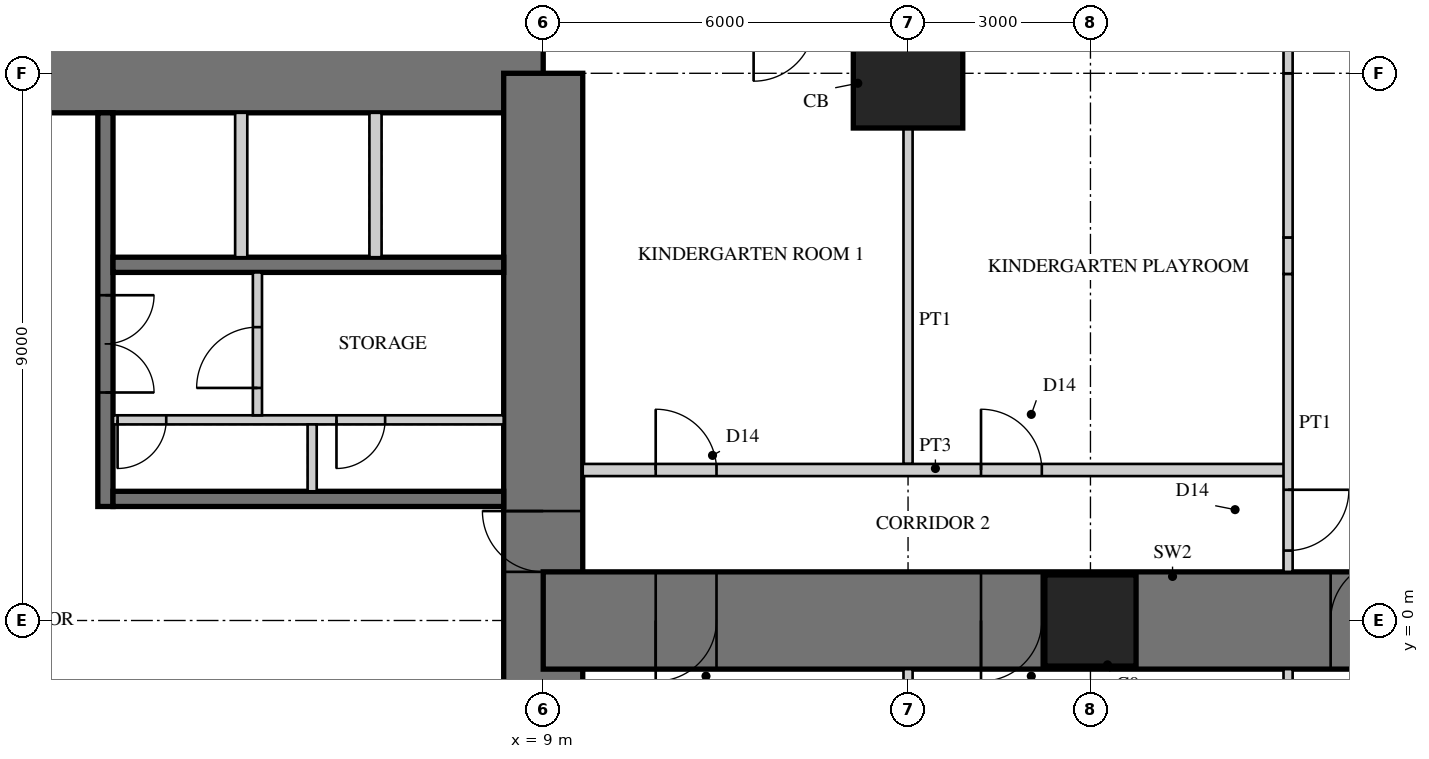
"""IFC4 building model, lengths in metres.
Left out: names, types, materials, properties, quantities, classifications, styles, units other than length and angle.
Written with IfcOpenShell. Run it as: python <this file> out.ifc"""

import sys

from ifc_helpers import new_model, si_unit, direction, frame, frame_2d, origin, origin_2d, place, context, subcontext, project, spatial, rectangle, extrude, element, fill, save


model = new_model("IFC4")
c1 = context("Model", 3, precision=1e-05, world=origin(), true_north=direction((0.0, 1.0)))
c2 = subcontext(c1, "Body", "Model", "MODEL_VIEW")
j1 = project(units=[si_unit("LENGTHUNIT", "METRE"), si_unit("PLANEANGLEUNIT", "RADIAN")], contexts=[c1])
p1 = place(None, origin())
s1 = spatial("IfcSite", under=j1, at=p1, CompositionType="ELEMENT")
p2 = place(p1, origin())
s2 = spatial("IfcBuilding", under=s1, at=p2, CompositionType="ELEMENT")
p3 = place(p2, frame((0.0, 0.0, 5.0)))
s3 = spatial("IfcBuildingStorey", under=s2, at=p3, CompositionType="ELEMENT", Elevation=5.0)
p4 = place(p3, frame((9.0, 9.0, 0.0), z_axis=(0.0, 0.0, 1.0), x_axis=(-1.0, 0.0, 0.0)))
e1 = element("IfcWall", 1, at=p4, inside=s3, PredefinedType="SHEAR", context=c2, shape_type="SweptSolid", body=[
    extrude(rectangle(XDim=18.0, YDim=1.3, at=frame_2d((9.0, 0.0))), origin(), (0.0, 0.0, 1.0), 4.5),
])
p5 = place(p4, frame((9.8, 0.0, 0.0)))
e2 = element("IfcOpeningElement", 2, at=p5, cuts=e1, PredefinedType="OPENING", context=c2, shape_type="SweptSolid", body=[
    extrude(rectangle(XDim=1.0, YDim=2.4, at=frame_2d((0.5, 1.2))), frame((0.0, 0.66, 0.0), z_axis=(0.0, -1.0, 0.0), x_axis=(1.0, 0.0, 0.0)), (0.0, 0.0, 1.0), 1.32),
])
p6 = place(p3, frame((9.0, -9.0, 0.0), z_axis=(0.0, 0.0, 1.0), x_axis=(0.0, 1.0, 0.0)))
e3 = element("IfcWall", 3, at=p6, inside=s3, PredefinedType="SHEAR", context=c2, shape_type="SweptSolid", body=[
    extrude(rectangle(XDim=18.0, YDim=1.3, at=frame_2d((9.0, 0.0))), origin(), (0.0, 0.0, 1.0), 4.5),
])
p7 = place(p6, frame((9.8, 0.0, 0.0)))
e4 = element("IfcOpeningElement", 4, at=p7, cuts=e3, PredefinedType="OPENING", context=c2, shape_type="SweptSolid", body=[
    extrude(rectangle(XDim=1.0, YDim=2.4, at=frame_2d((0.5, 1.2))), frame((0.0, 0.66, 0.0), z_axis=(0.0, -1.0, 0.0), x_axis=(1.0, 0.0, 0.0)), (0.0, 0.0, 1.0), 1.32),
])
p8 = place(p3, frame((1.8, 1.875, 0.0), z_axis=(0.0, 0.0, 1.0), x_axis=(0.0, 1.0, 0.0)))
e5 = element("IfcWall", 5, at=p8, inside=s3, PredefinedType="SHEAR", context=c2, shape_type="SweptSolid", body=[
    extrude(rectangle(XDim=6.475, YDim=0.25, at=frame_2d((3.238, 0.0))), origin(), (0.0, 0.0, 1.0), 4.5),
])
p9 = place(p8, frame((1.875, 0.0, 0.0)))
e6 = element("IfcOpeningElement", 6, at=p9, cuts=e5, PredefinedType="OPENING", context=c2, shape_type="SweptSolid", body=[
    extrude(rectangle(XDim=1.6, YDim=2.4, at=frame_2d((0.8, 1.2))), frame((0.0, 0.135, 0.0), z_axis=(0.0, -1.0, 0.0), x_axis=(1.0, 0.0, 0.0)), (0.0, 0.0, 1.0), 0.27),
])
for number, where, z_axis, x_axis in (
    (7, (1.925, 2.0, 0.0), (0.0, 0.0, 1.0), (1.0, 0.0, 0.0)),
    (8, (1.925, 5.85, 0.0), (0.0, 0.0, 1.0), (1.0, 0.0, 0.0)),
):
    element("IfcWall", number, at=place(p3, frame(where, z_axis=z_axis, x_axis=x_axis)), inside=s3, PredefinedType="SHEAR", context=c2, shape_type="SweptSolid", body=[
        extrude(rectangle(XDim=6.425, YDim=0.25, at=frame_2d((3.212, 0.0))), origin(), (0.0, 0.0, 1.0), 4.5),
    ])
p10 = place(p3, frame((1.925, 3.3, 0.0), z_axis=(0.0, 0.0, 1.0), x_axis=(1.0, 0.0, 0.0)))
e9 = element("IfcWall", 9, at=p10, inside=s3, PredefinedType="PARTITIONING", context=c2, shape_type="SweptSolid", body=[
    extrude(rectangle(XDim=6.425, YDim=0.15, at=frame_2d((3.212, 0.0))), origin(), (0.0, 0.0, 1.0), 4.5),
])
p11 = place(p10, frame((0.075, 0.0, 0.0)))
e10 = element("IfcOpeningElement", 10, at=p11, cuts=e9, PredefinedType="OPENING", context=c2, shape_type="SweptSolid", body=[
    extrude(rectangle(XDim=0.8, YDim=2.1, at=frame_2d((0.4, 1.05))), frame((0.0, 0.085, 0.0), z_axis=(0.0, -1.0, 0.0), x_axis=(1.0, 0.0, 0.0)), (0.0, 0.0, 1.0), 0.17),
])
p12 = place(p10, frame((3.675, 0.0, 0.0)))
e11 = element("IfcOpeningElement", 11, at=p12, cuts=e9, PredefinedType="OPENING", context=c2, shape_type="SweptSolid", body=[
    extrude(rectangle(XDim=0.8, YDim=2.1, at=frame_2d((0.4, 1.05))), frame((0.0, 0.085, 0.0), z_axis=(0.0, -1.0, 0.0), x_axis=(1.0, 0.0, 0.0)), (0.0, 0.0, 1.0), 0.17),
])
p13 = place(p3, frame((5.2, 2.125, 0.0), z_axis=(0.0, 0.0, 1.0), x_axis=(0.0, 1.0, 0.0)))
e12 = element("IfcWall", 12, at=p13, inside=s3, PredefinedType="PARTITIONING", context=c2, shape_type="SweptSolid", body=[
    extrude(rectangle(XDim=1.1, YDim=0.15, at=frame_2d((0.55, 0.0))), origin(), (0.0, 0.0, 1.0), 4.5),
])
for number, where, z_axis, x_axis in (
    (13, (4.033, 5.975, 0.0), (0.0, 0.0, 1.0), (0.0, 1.0, 0.0)),
    (14, (6.242, 5.975, 0.0), (0.0, 0.0, 1.0), (0.0, 1.0, 0.0)),
):
    element("IfcWall", number, at=place(p3, frame(where, z_axis=z_axis, x_axis=x_axis)), inside=s3, PredefinedType="PARTITIONING", context=c2, shape_type="SweptSolid", body=[
        extrude(rectangle(XDim=2.375, YDim=0.2, at=frame_2d((1.188, 0.0))), origin(), (0.0, 0.0, 1.0), 4.5),
    ])
p14 = place(p3, frame((9.0, 0.0, 0.0), z_axis=(0.0, 0.0, 1.0), x_axis=(1.0, 0.0, 0.0)))
e15 = element("IfcWall", 15, at=p14, inside=s3, PredefinedType="SHEAR", context=c2, shape_type="SweptSolid", body=[
    extrude(rectangle(XDim=18.0, YDim=1.6, at=frame_2d((9.0, 0.0))), origin(), (0.0, 0.0, 1.0), 4.5),
])
p15 = place(p14, frame((1.85, 0.0, 0.0)))
e16 = element("IfcOpeningElement", 16, at=p15, cuts=e15, PredefinedType="OPENING", context=c2, shape_type="SweptSolid", body=[
    extrude(rectangle(XDim=1.0, YDim=2.2, at=frame_2d((0.5, 1.1))), frame((0.0, 0.81, 0.0), z_axis=(0.0, -1.0, 0.0), x_axis=(1.0, 0.0, 0.0)), (0.0, 0.0, 1.0), 1.62),
])
p16 = place(p14, frame((7.2, 0.0, 0.0)))
e17 = element("IfcOpeningElement", 17, at=p16, cuts=e15, PredefinedType="OPENING", context=c2, shape_type="SweptSolid", body=[
    extrude(rectangle(XDim=1.0, YDim=2.2, at=frame_2d((0.5, 1.1))), frame((0.0, 0.81, 0.0), z_axis=(0.0, -1.0, 0.0), x_axis=(1.0, 0.0, 0.0)), (0.0, 0.0, 1.0), 1.62),
])
p17 = place(p14, frame((12.95, 0.0, 0.0)))
e18 = element("IfcOpeningElement", 18, at=p17, cuts=e15, PredefinedType="OPENING", context=c2, shape_type="SweptSolid", body=[
    extrude(rectangle(XDim=1.0, YDim=2.2, at=frame_2d((0.5, 1.1))), frame((0.0, 0.81, 0.0), z_axis=(0.0, -1.0, 0.0), x_axis=(1.0, 0.0, 0.0)), (0.0, 0.0, 1.0), 1.62),
])
p18 = place(p3, frame((15.0, 9.0, 0.0), z_axis=(0.0, 0.0, 1.0), x_axis=(1.0, 0.0, 0.0)))
e19 = element("IfcColumn", 19, at=p18, inside=s3, PredefinedType="COLUMN", context=c2, shape_type="SweptSolid", body=[
    extrude(rectangle(XDim=1.8, YDim=1.8, at=origin_2d()), origin(), (0.0, 0.0, 1.0), 4.5),
])
p19 = place(p3, frame((18.0, 0.0, 0.0), z_axis=(0.0, 0.0, 1.0), x_axis=(1.0, 0.0, 0.0)))
e20 = element("IfcColumn", 20, at=p19, inside=s3, PredefinedType="COLUMN", context=c2, shape_type="SweptSolid", body=[
    extrude(rectangle(XDim=1.5, YDim=1.5, at=origin_2d()), origin(), (0.0, 0.0, 1.0), 4.5),
])
p20 = place(p3, frame((4.3, 3.375, 0.0), z_axis=(0.0, 0.0, 1.0), x_axis=(0.0, 1.0, 0.0)))
e21 = element("IfcWall", 21, at=p20, inside=s3, PredefinedType="PARTITIONING", context=c2, shape_type="SweptSolid", body=[
    extrude(rectangle(XDim=2.35, YDim=0.15, at=frame_2d((1.175, 0.0))), origin(), (0.0, 0.0, 1.0), 4.3),
])
p21 = place(p20, frame((0.45, 0.0, 0.0)))
e22 = element("IfcOpeningElement", 22, at=p21, cuts=e21, PredefinedType="OPENING", context=c2, shape_type="SweptSolid", body=[
    extrude(rectangle(XDim=1.0, YDim=2.1, at=frame_2d((0.5, 1.05))), frame((0.0, 0.085, 0.0), z_axis=(0.0, -1.0, 0.0), x_axis=(1.0, 0.0, 0.0)), (0.0, 0.0, 1.0), 0.17),
])
p22 = place(p3, frame((15.0, 2.575, 0.0), z_axis=(0.0, 0.0, 1.0), x_axis=(0.0, 1.0, 0.0)))
e23 = element("IfcWall", 23, at=p22, inside=s3, PredefinedType="PARTITIONING", context=c2, shape_type="SweptSolid", body=[
    extrude(rectangle(XDim=5.675, YDim=0.15, at=frame_2d((2.837, 0.0))), origin(), (0.0, 0.0, 1.0), 3.35),
])
p23 = place(p3, frame((15.0, -8.25, 0.0), z_axis=(0.0, 0.0, 1.0), x_axis=(0.0, 1.0, 0.0)))
e24 = element("IfcWall", 24, at=p23, inside=s3, PredefinedType="PARTITIONING", context=c2, shape_type="SweptSolid", body=[
    extrude(rectangle(XDim=7.45, YDim=0.15, at=frame_2d((3.725, 0.0))), origin(), (0.0, 0.0, 1.0), 3.35),
])
p24 = place(p3, frame((9.65, 2.475, 0.0), z_axis=(0.0, 0.0, 1.0), x_axis=(1.0, 0.0, 0.0)))
e25 = element("IfcWall", 25, at=p24, inside=s3, PredefinedType="SOLIDWALL", context=c2, shape_type="SweptSolid", body=[
    extrude(rectangle(XDim=11.6, YDim=0.2, at=frame_2d((5.8, 0.0))), origin(), (0.0, 0.0, 1.0), 4.3),
])
p25 = place(p24, frame((1.2, 0.0, 0.0)))
e26 = element("IfcOpeningElement", 26, at=p25, cuts=e25, PredefinedType="OPENING", context=c2, shape_type="SweptSolid", body=[
    extrude(rectangle(XDim=1.0, YDim=2.2, at=frame_2d((0.5, 1.1))), frame((0.0, 0.11, 0.0), z_axis=(0.0, -1.0, 0.0), x_axis=(1.0, 0.0, 0.0)), (0.0, 0.0, 1.0), 0.22),
])
p26 = place(p24, frame((6.55, 0.0, 0.0)))
e27 = element("IfcOpeningElement", 27, at=p26, cuts=e25, PredefinedType="OPENING", context=c2, shape_type="SweptSolid", body=[
    extrude(rectangle(XDim=1.0, YDim=2.2, at=frame_2d((0.5, 1.1))), frame((0.0, 0.11, 0.0), z_axis=(0.0, -1.0, 0.0), x_axis=(1.0, 0.0, 0.0)), (0.0, 0.0, 1.0), 0.22),
])
p27 = place(p3, frame((21.25, -5.7, 0.0), z_axis=(0.0, 0.0, 1.0), x_axis=(0.0, 1.0, 0.0)))
e28 = element("IfcWall", 28, at=p27, inside=s3, PredefinedType="PARTITIONING", context=c2, shape_type="SweptSolid", body=[
    extrude(rectangle(XDim=4.9, YDim=0.15, at=frame_2d((2.45, 0.0))), origin(), (0.0, 0.0, 1.0), 3.35),
])
p28 = place(p3, frame((21.25, 0.8, 0.0), z_axis=(0.0, 0.0, 1.0), x_axis=(0.0, 1.0, 0.0)))
e29 = element("IfcWall", 29, at=p28, inside=s3, PredefinedType="PARTITIONING", context=c2, shape_type="SweptSolid", body=[
    extrude(rectangle(XDim=4.9, YDim=0.15, at=frame_2d((2.45, 0.0))), origin(), (0.0, 0.0, 1.0), 3.35),
])
p29 = place(p28, frame((0.35, 0.0, 0.0)))
e30 = element("IfcOpeningElement", 30, at=p29, cuts=e29, PredefinedType="OPENING", context=c2, shape_type="SweptSolid", body=[
    extrude(rectangle(XDim=1.0, YDim=2.2, at=frame_2d((0.5, 1.1))), frame((0.0, 0.085, 0.0), z_axis=(0.0, -1.0, 0.0), x_axis=(1.0, 0.0, 0.0)), (0.0, 0.0, 1.0), 0.17),
])
p30 = place(p3, frame((21.25, 5.7, 0.0), z_axis=(0.0, 0.0, 1.0), x_axis=(0.0, 1.0, 0.0)))
e31 = element("IfcWall", 31, at=p30, inside=s3, PredefinedType="PARTITIONING", context=c2, shape_type="SweptSolid", body=[
    extrude(rectangle(XDim=0.6, YDim=0.15, at=frame_2d((0.3, 0.0))), origin(), (0.0, 0.0, 1.0), 4.3),
])
p31 = place(p3, frame((21.25, 6.3, 0.0), z_axis=(0.0, 0.0, 1.0), x_axis=(0.0, 1.0, 0.0)))
e32 = element("IfcWall", 32, at=p31, inside=s3, PredefinedType="PARTITIONING", context=c2, shape_type="SweptSolid", body=[
    extrude(rectangle(XDim=2.7, YDim=0.15, at=frame_2d((1.35, 0.0))), origin(), (0.0, 0.0, 1.0), 3.35),
])
p32 = place(p3, frame((21.25, 9.0, 0.0), z_axis=(0.0, 0.0, 1.0), x_axis=(0.0, 1.0, 0.0)))
e33 = element("IfcWall", 33, at=p32, inside=s3, PredefinedType="PARTITIONING", context=c2, shape_type="SweptSolid", body=[
    extrude(rectangle(XDim=0.72, YDim=0.15, at=frame_2d((0.36, 0.0))), origin(), (0.0, 0.0, 1.0), 4.3),
])
p33 = place(p21, origin())
e34 = element("IfcDoor", 34, at=p33, inside=s3, OperationType="SINGLE_SWING_LEFT", PredefinedType="DOOR", context=c2, shape_type="SweptSolid", body=[
    extrude(rectangle(XDim=1.0, YDim=2.1, at=frame_2d((0.5, 1.05))), frame((0.0, 0.025, 0.0), z_axis=(0.0, -1.0, 0.0), x_axis=(1.0, 0.0, 0.0)), (0.0, 0.0, 1.0), 0.05),
])
fill(e22, e34)
p34 = place(p25, origin())
e35 = element("IfcDoor", 35, at=p34, inside=s3, OperationType="SINGLE_SWING_LEFT", PredefinedType="DOOR", context=c2, shape_type="SweptSolid", body=[
    extrude(rectangle(XDim=1.0, YDim=2.2, at=frame_2d((0.5, 1.1))), frame((0.0, 0.025, 0.0), z_axis=(0.0, -1.0, 0.0), x_axis=(1.0, 0.0, 0.0)), (0.0, 0.0, 1.0), 0.05),
])
fill(e26, e35)
p35 = place(p26, origin())
e36 = element("IfcDoor", 36, at=p35, inside=s3, OperationType="SINGLE_SWING_LEFT", PredefinedType="DOOR", context=c2, shape_type="SweptSolid", body=[
    extrude(rectangle(XDim=1.0, YDim=2.2, at=frame_2d((0.5, 1.1))), frame((0.0, 0.025, 0.0), z_axis=(0.0, -1.0, 0.0), x_axis=(1.0, 0.0, 0.0)), (0.0, 0.0, 1.0), 0.05),
])
fill(e27, e36)
p36 = place(p29, frame((1.0, 0.0, 0.0), z_axis=(0.0, 0.0, 1.0), x_axis=(-1.0, 0.0, 0.0)))
e37 = element("IfcDoor", 37, at=p36, inside=s3, OperationType="SINGLE_SWING_LEFT", PredefinedType="DOOR", context=c2, shape_type="SweptSolid", body=[
    extrude(rectangle(XDim=1.0, YDim=2.2, at=frame_2d((0.5, 1.1))), frame((0.0, 0.025, 0.0), z_axis=(0.0, -1.0, 0.0), x_axis=(1.0, 0.0, 0.0)), (0.0, 0.0, 1.0), 0.05),
])
fill(e30, e37)
p37 = place(p15, frame((1.0, 0.0, 0.0), z_axis=(0.0, 0.0, 1.0), x_axis=(-1.0, 0.0, 0.0)))
e38 = element("IfcDoor", 38, at=p37, inside=s3, OperationType="SINGLE_SWING_RIGHT", PredefinedType="DOOR", context=c2, shape_type="SweptSolid", body=[
    extrude(rectangle(XDim=1.0, YDim=2.2, at=frame_2d((0.5, 1.1))), frame((0.0, 0.025, 0.0), z_axis=(0.0, -1.0, 0.0), x_axis=(1.0, 0.0, 0.0)), (0.0, 0.0, 1.0), 0.05),
])
fill(e16, e38)
p38 = place(p16, frame((1.0, 0.0, 0.0), z_axis=(0.0, 0.0, 1.0), x_axis=(-1.0, 0.0, 0.0)))
e39 = element("IfcDoor", 39, at=p38, inside=s3, OperationType="SINGLE_SWING_RIGHT", PredefinedType="DOOR", context=c2, shape_type="SweptSolid", body=[
    extrude(rectangle(XDim=1.0, YDim=2.2, at=frame_2d((0.5, 1.1))), frame((0.0, 0.025, 0.0), z_axis=(0.0, -1.0, 0.0), x_axis=(1.0, 0.0, 0.0)), (0.0, 0.0, 1.0), 0.05),
])
fill(e17, e39)
p39 = place(p17, origin())
e40 = element("IfcDoor", 40, at=p39, inside=s3, OperationType="SINGLE_SWING_RIGHT", PredefinedType="DOOR", context=c2, shape_type="SweptSolid", body=[
    extrude(rectangle(XDim=1.0, YDim=2.2, at=frame_2d((0.5, 1.1))), frame((0.0, 0.025, 0.0), z_axis=(0.0, -1.0, 0.0), x_axis=(1.0, 0.0, 0.0)), (0.0, 0.0, 1.0), 0.05),
])
fill(e18, e40)
p40 = place(p7, origin())
e41 = element("IfcDoor", 41, at=p40, inside=s3, OperationType="SINGLE_SWING_RIGHT", PredefinedType="DOOR", context=c2, shape_type="SweptSolid", body=[
    extrude(rectangle(XDim=1.0, YDim=2.4, at=frame_2d((0.5, 1.2))), frame((0.0, 0.055, 0.0), z_axis=(0.0, -1.0, 0.0), x_axis=(1.0, 0.0, 0.0)), (0.0, 0.0, 1.0), 0.05),
])
fill(e4, e41)
p41 = place(p9, frame((1.6, 0.0, 0.0), z_axis=(0.0, 0.0, 1.0), x_axis=(-1.0, 0.0, 0.0)))
e42 = element("IfcDoor", 42, at=p41, inside=s3, OperationType="DOUBLE_DOOR_SINGLE_SWING", PredefinedType="DOOR", context=c2, shape_type="SweptSolid", body=[
    extrude(rectangle(XDim=1.6, YDim=2.4, at=frame_2d((0.8, 1.2))), frame((0.0, 0.025, 0.0), z_axis=(0.0, -1.0, 0.0), x_axis=(1.0, 0.0, 0.0)), (0.0, 0.0, 1.0), 0.05),
])
fill(e6, e42)
p42 = place(p11, frame((0.8, 0.0, 0.0), z_axis=(0.0, 0.0, 1.0), x_axis=(-1.0, 0.0, 0.0)))
e43 = element("IfcDoor", 43, at=p42, inside=s3, OperationType="SINGLE_SWING_RIGHT", PredefinedType="DOOR", context=c2, shape_type="SweptSolid", body=[
    extrude(rectangle(XDim=0.8, YDim=2.1, at=frame_2d((0.4, 1.05))), frame((0.0, 0.025, 0.0), z_axis=(0.0, -1.0, 0.0), x_axis=(1.0, 0.0, 0.0)), (0.0, 0.0, 1.0), 0.05),
])
fill(e10, e43)
p43 = place(p12, frame((0.8, 0.0, 0.0), z_axis=(0.0, 0.0, 1.0), x_axis=(-1.0, 0.0, 0.0)))
e44 = element("IfcDoor", 44, at=p43, inside=s3, OperationType="SINGLE_SWING_RIGHT", PredefinedType="DOOR", context=c2, shape_type="SweptSolid", body=[
    extrude(rectangle(XDim=0.8, YDim=2.1, at=frame_2d((0.4, 1.05))), frame((0.0, 0.025, 0.0), z_axis=(0.0, -1.0, 0.0), x_axis=(1.0, 0.0, 0.0)), (0.0, 0.0, 1.0), 0.05),
])
fill(e11, e44)
save(model, sys.argv[1])
